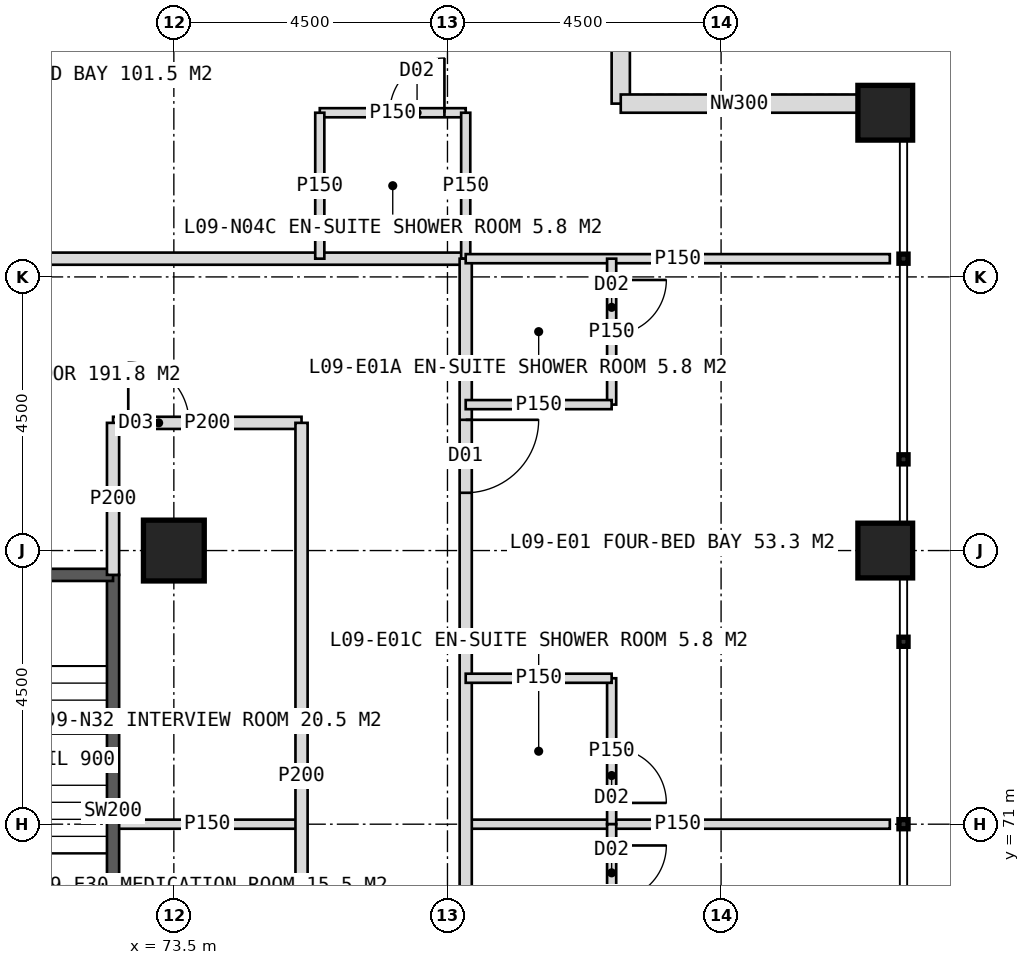
"""IFC4 building model, lengths in metres.
Left out: names, types, materials, properties, quantities, classifications, styles, units other than length and angle.
Written with IfcOpenShell. Run it as: python <this file> out.ifc"""

import sys

from ifc_helpers import new_model, si_unit, direction, frame, frame_2d, origin, origin_2d, place, context, subcontext, project, spatial, rectangle, hollow_rectangle, extrude, element, fill, save


model = new_model("IFC4")
c1 = context("Model", 3, precision=1e-05, world=origin(), true_north=direction((0.0, 1.0)))
c2 = subcontext(c1, "Body", "Model", "MODEL_VIEW")
j1 = project(units=[si_unit("LENGTHUNIT", "METRE"), si_unit("PLANEANGLEUNIT", "RADIAN")], contexts=[c1])
p1 = place(None, origin())
s1 = spatial("IfcSite", under=j1, at=p1, CompositionType="ELEMENT")
p2 = place(p1, origin())
s2 = spatial("IfcBuilding", under=s1, at=p2, CompositionType="ELEMENT")
p3 = place(p2, frame((0.0, 0.0, 43.0)))
s3 = spatial("IfcBuildingStorey", under=s2, at=p3, CompositionType="ELEMENT", Elevation=43.0)
p4 = place(p3, frame((73.5, 75.5, 0.0), z_axis=(0.0, 0.0, 1.0), x_axis=(1.0, 0.0, 0.0)))
e1 = element("IfcColumn", 1, at=p4, inside=s3, PredefinedType="COLUMN", context=c2, shape_type="SweptSolid", body=[
    extrude(hollow_rectangle(XDim=1.0, YDim=1.0, WallThickness=0.1, at=origin_2d()), origin(), (0.0, 0.0, 1.0), 4.0),
])
for number, where, z_axis, x_axis in (
    (2, (85.2, 75.5, 0.0), (0.0, 0.0, 1.0), (1.0, 0.0, 0.0)),
    (3, (85.2, 82.7, 0.0), (0.0, 0.0, 1.0), (1.0, 0.0, 0.0)),
):
    element("IfcColumn", number, at=place(p3, frame(where, z_axis=z_axis, x_axis=x_axis)), inside=s3, PredefinedType="COLUMN", context=c2, shape_type="SweptSolid", body=[
        extrude(hollow_rectangle(XDim=0.9, YDim=0.9, WallThickness=0.08, at=origin_2d()), origin(), (0.0, 0.0, 1.0), 4.0),
    ])
for number, where, z_axis, x_axis in (
    (4, (80.85, 86.75, 0.0), (0.0, 0.0, 1.0), (0.0, -1.0, 0.0)),
    (5, (80.85, 82.85, 0.0), (0.0, 0.0, 1.0), (1.0, 0.0, 0.0)),
):
    element("IfcWall", number, at=place(p3, frame(where, z_axis=z_axis, x_axis=x_axis)), inside=s3, PredefinedType="ELEMENTEDWALL", context=c2, shape_type="SweptSolid", body=[
        extrude(rectangle(XDim=3.9, YDim=0.3, at=frame_2d((1.95, 0.0))), origin(), (0.0, 0.0, 1.0), 2.95),
    ])
p5 = place(p3, frame((41.7, 80.3, 0.0), z_axis=(0.0, 0.0, 1.0), x_axis=(1.0, 0.0, 0.0)))
e6 = element("IfcWall", 6, at=p5, inside=s3, PredefinedType="PARTITIONING", context=c2, shape_type="SweptSolid", body=[
    extrude(rectangle(XDim=36.6, YDim=0.2, at=frame_2d((18.3, 0.0))), origin(), (0.0, 0.0, 1.0), 3.75),
])
p6 = place(p5, frame((2.65, 0.0, 0.0)))
e7 = element("IfcOpeningElement", 7, at=p6, cuts=e6, PredefinedType="OPENING", context=c2, shape_type="SweptSolid", body=[
    extrude(rectangle(XDim=1.2, YDim=2.2, at=frame_2d((0.6, 1.1))), frame((0.0, 0.11, 0.0), z_axis=(0.0, -1.0, 0.0), x_axis=(1.0, 0.0, 0.0)), (0.0, 0.0, 1.0), 0.22),
])
p7 = place(p5, frame((11.95, 0.0, 0.0)))
e8 = element("IfcOpeningElement", 8, at=p7, cuts=e6, PredefinedType="OPENING", context=c2, shape_type="SweptSolid", body=[
    extrude(rectangle(XDim=1.2, YDim=2.2, at=frame_2d((0.6, 1.1))), frame((0.0, 0.11, 0.0), z_axis=(0.0, -1.0, 0.0), x_axis=(1.0, 0.0, 0.0)), (0.0, 0.0, 1.0), 0.22),
])
p8 = place(p5, frame((20.8, 0.0, 0.0)))
e9 = element("IfcOpeningElement", 9, at=p8, cuts=e6, PredefinedType="OPENING", context=c2, shape_type="SweptSolid", body=[
    extrude(rectangle(XDim=1.0, YDim=2.1, at=frame_2d((0.5, 1.05))), frame((0.0, 0.11, 0.0), z_axis=(0.0, -1.0, 0.0), x_axis=(1.0, 0.0, 0.0)), (0.0, 0.0, 1.0), 0.22),
])
p9 = place(p5, frame((26.95, 0.0, 0.0)))
e10 = element("IfcOpeningElement", 10, at=p9, cuts=e6, PredefinedType="OPENING", context=c2, shape_type="SweptSolid", body=[
    extrude(rectangle(XDim=1.2, YDim=2.2, at=frame_2d((0.6, 1.1))), frame((0.0, 0.11, 0.0), z_axis=(0.0, -1.0, 0.0), x_axis=(1.0, 0.0, 0.0)), (0.0, 0.0, 1.0), 0.22),
])
p10 = place(p3, frame((75.9, 82.7, 0.0), z_axis=(0.0, 0.0, 1.0), x_axis=(1.0, 0.0, 0.0)))
e11 = element("IfcWall", 11, at=p10, inside=s3, PredefinedType="PARTITIONING", context=c2, shape_type="SweptSolid", body=[
    extrude(rectangle(XDim=2.4, YDim=0.15, at=frame_2d((1.2, 0.0))), origin(), (0.0, 0.0, 1.0), 2.95),
])
p11 = place(p10, frame((1.15, 0.0, 0.0)))
e12 = element("IfcOpeningElement", 12, at=p11, cuts=e11, PredefinedType="OPENING", context=c2, shape_type="SweptSolid", body=[
    extrude(rectangle(XDim=0.9, YDim=2.1, at=frame_2d((0.45, 1.05))), frame((0.0, 0.085, 0.0), z_axis=(0.0, -1.0, 0.0), x_axis=(1.0, 0.0, 0.0)), (0.0, 0.0, 1.0), 0.17),
])
for number, where, z_axis, x_axis in (
    (13, (75.9, 80.3, 0.0), (0.0, 0.0, 1.0), (0.0, 1.0, 0.0)),
    (14, (78.3, 80.3, 0.0), (0.0, 0.0, 1.0), (0.0, 1.0, 0.0)),
):
    element("IfcWall", number, at=place(p3, frame(where, z_axis=z_axis, x_axis=x_axis)), inside=s3, PredefinedType="PARTITIONING", context=c2, shape_type="SweptSolid", body=[
        extrude(rectangle(XDim=2.4, YDim=0.15, at=frame_2d((1.2, 0.0))), origin(), (0.0, 0.0, 1.0), 3.75),
    ])
p12 = place(p3, frame((72.5, 77.6, 0.0), z_axis=(0.0, 0.0, 1.0), x_axis=(1.0, 0.0, 0.0)))
e15 = element("IfcWall", 15, at=p12, inside=s3, PredefinedType="PARTITIONING", context=c2, shape_type="SweptSolid", body=[
    extrude(rectangle(XDim=3.1, YDim=0.2, at=frame_2d((1.55, 0.0))), origin(), (0.0, 0.0, 1.0), 3.75),
])
p13 = place(p12, frame((0.25, 0.0, 0.0)))
e16 = element("IfcOpeningElement", 16, at=p13, cuts=e15, PredefinedType="OPENING", context=c2, shape_type="SweptSolid", body=[
    extrude(rectangle(XDim=1.0, YDim=2.1, at=frame_2d((0.5, 1.05))), frame((0.0, 0.11, 0.0), z_axis=(0.0, -1.0, 0.0), x_axis=(1.0, 0.0, 0.0)), (0.0, 0.0, 1.0), 0.22),
])
p14 = place(p3, frame((78.3, 71.0, 0.0), z_axis=(0.0, 0.0, 1.0), x_axis=(1.0, 0.0, 0.0)))
e17 = element("IfcWall", 17, at=p14, inside=s3, PredefinedType="PARTITIONING", context=c2, shape_type="SweptSolid", body=[
    extrude(rectangle(XDim=6.975, YDim=0.15, at=frame_2d((3.487, 0.0))), origin(), (0.0, 0.0, 1.0), 3.75),
])
p15 = place(p3, frame((78.3, 80.3, 0.0), z_axis=(0.0, 0.0, 1.0), x_axis=(0.0, -1.0, 0.0)))
e18 = element("IfcWall", 18, at=p15, inside=s3, PredefinedType="PARTITIONING", context=c2, shape_type="SweptSolid", body=[
    extrude(rectangle(XDim=36.6, YDim=0.2, at=frame_2d((18.3, 0.0))), origin(), (0.0, 0.0, 1.0), 3.75),
])
p16 = place(p15, frame((2.65, 0.0, 0.0)))
e19 = element("IfcOpeningElement", 19, at=p16, cuts=e18, PredefinedType="OPENING", context=c2, shape_type="SweptSolid", body=[
    extrude(rectangle(XDim=1.2, YDim=2.2, at=frame_2d((0.6, 1.1))), frame((0.0, 0.11, 0.0), z_axis=(0.0, -1.0, 0.0), x_axis=(1.0, 0.0, 0.0)), (0.0, 0.0, 1.0), 0.22),
])
p17 = place(p15, frame((11.95, 0.0, 0.0)))
e20 = element("IfcOpeningElement", 20, at=p17, cuts=e18, PredefinedType="OPENING", context=c2, shape_type="SweptSolid", body=[
    extrude(rectangle(XDim=1.2, YDim=2.2, at=frame_2d((0.6, 1.1))), frame((0.0, 0.11, 0.0), z_axis=(0.0, -1.0, 0.0), x_axis=(1.0, 0.0, 0.0)), (0.0, 0.0, 1.0), 0.22),
])
p18 = place(p15, frame((20.95, 0.0, 0.0)))
e21 = element("IfcOpeningElement", 21, at=p18, cuts=e18, PredefinedType="OPENING", context=c2, shape_type="SweptSolid", body=[
    extrude(rectangle(XDim=1.2, YDim=2.2, at=frame_2d((0.6, 1.1))), frame((0.0, 0.11, 0.0), z_axis=(0.0, -1.0, 0.0), x_axis=(1.0, 0.0, 0.0)), (0.0, 0.0, 1.0), 0.22),
])
p19 = place(p15, frame((29.95, 0.0, 0.0)))
e22 = element("IfcOpeningElement", 22, at=p19, cuts=e18, PredefinedType="OPENING", context=c2, shape_type="SweptSolid", body=[
    extrude(rectangle(XDim=1.2, YDim=2.2, at=frame_2d((0.6, 1.1))), frame((0.0, 0.11, 0.0), z_axis=(0.0, -1.0, 0.0), x_axis=(1.0, 0.0, 0.0)), (0.0, 0.0, 1.0), 0.22),
])
p20 = place(p3, frame((78.3, 80.3, 0.0), z_axis=(0.0, 0.0, 1.0), x_axis=(1.0, 0.0, 0.0)))
e23 = element("IfcWall", 23, at=p20, inside=s3, PredefinedType="PARTITIONING", context=c2, shape_type="SweptSolid", body=[
    extrude(rectangle(XDim=6.975, YDim=0.15, at=frame_2d((3.487, 0.0))), origin(), (0.0, 0.0, 1.0), 3.75),
])
p21 = place(p3, frame((80.7, 80.3, 0.0), z_axis=(0.0, 0.0, 1.0), x_axis=(0.0, -1.0, 0.0)))
e24 = element("IfcWall", 24, at=p21, inside=s3, PredefinedType="PARTITIONING", context=c2, shape_type="SweptSolid", body=[
    extrude(rectangle(XDim=2.4, YDim=0.15, at=frame_2d((1.2, 0.0))), origin(), (0.0, 0.0, 1.0), 2.95),
])
p22 = place(p21, frame((0.35, 0.0, 0.0)))
e25 = element("IfcOpeningElement", 25, at=p22, cuts=e24, PredefinedType="OPENING", context=c2, shape_type="SweptSolid", body=[
    extrude(rectangle(XDim=0.9, YDim=2.1, at=frame_2d((0.45, 1.05))), frame((0.0, 0.085, 0.0), z_axis=(0.0, -1.0, 0.0), x_axis=(1.0, 0.0, 0.0)), (0.0, 0.0, 1.0), 0.17),
])
p23 = place(p3, frame((78.3, 77.9, 0.0), z_axis=(0.0, 0.0, 1.0), x_axis=(1.0, 0.0, 0.0)))
e26 = element("IfcWall", 26, at=p23, inside=s3, PredefinedType="PARTITIONING", context=c2, shape_type="SweptSolid", body=[
    extrude(rectangle(XDim=2.4, YDim=0.15, at=frame_2d((1.2, 0.0))), origin(), (0.0, 0.0, 1.0), 3.75),
])
p24 = place(p3, frame((80.7, 73.4, 0.0), z_axis=(0.0, 0.0, 1.0), x_axis=(0.0, -1.0, 0.0)))
e27 = element("IfcWall", 27, at=p24, inside=s3, PredefinedType="PARTITIONING", context=c2, shape_type="SweptSolid", body=[
    extrude(rectangle(XDim=2.4, YDim=0.15, at=frame_2d((1.2, 0.0))), origin(), (0.0, 0.0, 1.0), 3.75),
])
p25 = place(p24, frame((1.15, 0.0, 0.0)))
e28 = element("IfcOpeningElement", 28, at=p25, cuts=e27, PredefinedType="OPENING", context=c2, shape_type="SweptSolid", body=[
    extrude(rectangle(XDim=0.9, YDim=2.1, at=frame_2d((0.45, 1.05))), frame((0.0, 0.085, 0.0), z_axis=(0.0, -1.0, 0.0), x_axis=(1.0, 0.0, 0.0)), (0.0, 0.0, 1.0), 0.17),
])
p26 = place(p3, frame((78.3, 73.4, 0.0), z_axis=(0.0, 0.0, 1.0), x_axis=(1.0, 0.0, 0.0)))
e29 = element("IfcWall", 29, at=p26, inside=s3, PredefinedType="PARTITIONING", context=c2, shape_type="SweptSolid", body=[
    extrude(rectangle(XDim=2.4, YDim=0.15, at=frame_2d((1.2, 0.0))), origin(), (0.0, 0.0, 1.0), 3.75),
])
p27 = place(p3, frame((80.7, 71.0, 0.0), z_axis=(0.0, 0.0, 1.0), x_axis=(0.0, -1.0, 0.0)))
e30 = element("IfcWall", 30, at=p27, inside=s3, PredefinedType="PARTITIONING", context=c2, shape_type="SweptSolid", body=[
    extrude(rectangle(XDim=2.4, YDim=0.15, at=frame_2d((1.2, 0.0))), origin(), (0.0, 0.0, 1.0), 3.75),
])
p28 = place(p27, frame((0.35, 0.0, 0.0)))
e31 = element("IfcOpeningElement", 31, at=p28, cuts=e30, PredefinedType="OPENING", context=c2, shape_type="SweptSolid", body=[
    extrude(rectangle(XDim=0.9, YDim=2.1, at=frame_2d((0.45, 1.05))), frame((0.0, 0.085, 0.0), z_axis=(0.0, -1.0, 0.0), x_axis=(1.0, 0.0, 0.0)), (0.0, 0.0, 1.0), 0.17),
])
p29 = place(p3, frame((72.5, 71.0, 0.0), z_axis=(0.0, 0.0, 1.0), x_axis=(1.0, 0.0, 0.0)))
e32 = element("IfcWall", 32, at=p29, inside=s3, PredefinedType="PARTITIONING", context=c2, shape_type="SweptSolid", body=[
    extrude(rectangle(XDim=3.1, YDim=0.15, at=frame_2d((1.55, 0.0))), origin(), (0.0, 0.0, 1.0), 3.75),
])
p30 = place(p3, frame((75.6, 77.6, 0.0), z_axis=(0.0, 0.0, 1.0), x_axis=(0.0, -1.0, 0.0)))
e33 = element("IfcWall", 33, at=p30, inside=s3, PredefinedType="PARTITIONING", context=c2, shape_type="SweptSolid", body=[
    extrude(rectangle(XDim=11.6, YDim=0.2, at=frame_2d((5.8, 0.0))), origin(), (0.0, 0.0, 1.0), 3.75),
])
p31 = place(p30, frame((8.6, 0.0, 0.0)))
e34 = element("IfcOpeningElement", 34, at=p31, cuts=e33, PredefinedType="OPENING", context=c2, shape_type="SweptSolid", body=[
    extrude(rectangle(XDim=1.0, YDim=2.1, at=frame_2d((0.5, 1.05))), frame((0.0, 0.11, 0.0), z_axis=(0.0, -1.0, 0.0), x_axis=(1.0, 0.0, 0.0)), (0.0, 0.0, 1.0), 0.22),
])
p32 = place(p3, frame((72.5, 67.35, 0.0), z_axis=(0.0, 0.0, 1.0), x_axis=(0.0, 1.0, 0.0)))
e35 = element("IfcWall", 35, at=p32, inside=s3, PredefinedType="SOLIDWALL", context=c2, shape_type="SweptSolid", body=[
    extrude(rectangle(XDim=7.75, YDim=0.2, at=frame_2d((3.875, 0.0))), origin(), (0.0, 0.0, 1.0), 3.75),
])
p33 = place(p3, frame((69.0, 75.1, 0.0), z_axis=(0.0, 0.0, 1.0), x_axis=(1.0, 0.0, 0.0)))
e36 = element("IfcWall", 36, at=p33, inside=s3, PredefinedType="SOLIDWALL", context=c2, shape_type="SweptSolid", body=[
    extrude(rectangle(XDim=3.5, YDim=0.2, at=frame_2d((1.75, 0.0))), origin(), (0.0, 0.0, 1.0), 3.75),
])
p34 = place(p33, frame((1.15, 0.0, 0.0)))
e37 = element("IfcOpeningElement", 37, at=p34, cuts=e36, PredefinedType="OPENING", context=c2, shape_type="SweptSolid", body=[
    extrude(rectangle(XDim=1.2, YDim=2.1, at=frame_2d((0.6, 1.05))), frame((0.0, 0.11, 0.0), z_axis=(0.0, -1.0, 0.0), x_axis=(1.0, 0.0, 0.0)), (0.0, 0.0, 1.0), 0.22),
])
p35 = place(p3, frame((72.5, 75.1, 0.0), z_axis=(0.0, 0.0, 1.0), x_axis=(0.0, 1.0, 0.0)))
e38 = element("IfcWall", 38, at=p35, inside=s3, PredefinedType="PARTITIONING", context=c2, shape_type="SweptSolid", body=[
    extrude(rectangle(XDim=2.5, YDim=0.2, at=frame_2d((1.25, 0.0))), origin(), (0.0, 0.0, 1.0), 3.75),
])
p36 = place(p11, origin())
e39 = element("IfcDoor", 39, at=p36, inside=s3, OperationType="SINGLE_SWING_RIGHT", PredefinedType="DOOR", context=c2, shape_type="SweptSolid", body=[
    extrude(rectangle(XDim=0.9, YDim=2.1, at=frame_2d((0.45, 1.05))), frame((0.0, 0.025, 0.0), z_axis=(0.0, -1.0, 0.0), x_axis=(1.0, 0.0, 0.0)), (0.0, 0.0, 1.0), 0.05),
])
fill(e12, e39)
p37 = place(p13, origin())
e40 = element("IfcDoor", 40, at=p37, inside=s3, OperationType="SINGLE_SWING_LEFT", PredefinedType="DOOR", context=c2, shape_type="SweptSolid", body=[
    extrude(rectangle(XDim=1.0, YDim=2.1, at=frame_2d((0.5, 1.05))), frame((0.0, 0.025, 0.0), z_axis=(0.0, -1.0, 0.0), x_axis=(1.0, 0.0, 0.0)), (0.0, 0.0, 1.0), 0.05),
])
fill(e16, e40)
p38 = place(p16, origin())
e41 = element("IfcDoor", 41, at=p38, inside=s3, OperationType="SINGLE_SWING_LEFT", PredefinedType="DOOR", context=c2, shape_type="SweptSolid", body=[
    extrude(rectangle(XDim=1.2, YDim=2.2, at=frame_2d((0.6, 1.1))), frame((0.0, 0.025, 0.0), z_axis=(0.0, -1.0, 0.0), x_axis=(1.0, 0.0, 0.0)), (0.0, 0.0, 1.0), 0.05),
])
fill(e19, e41)
p39 = place(p22, origin())
e42 = element("IfcDoor", 42, at=p39, inside=s3, OperationType="SINGLE_SWING_LEFT", PredefinedType="DOOR", context=c2, shape_type="SweptSolid", body=[
    extrude(rectangle(XDim=0.9, YDim=2.1, at=frame_2d((0.45, 1.05))), frame((0.0, 0.025, 0.0), z_axis=(0.0, -1.0, 0.0), x_axis=(1.0, 0.0, 0.0)), (0.0, 0.0, 1.0), 0.05),
])
fill(e25, e42)
p40 = place(p25, origin())
e43 = element("IfcDoor", 43, at=p40, inside=s3, OperationType="SINGLE_SWING_RIGHT", PredefinedType="DOOR", context=c2, shape_type="SweptSolid", body=[
    extrude(rectangle(XDim=0.9, YDim=2.1, at=frame_2d((0.45, 1.05))), frame((0.0, 0.025, 0.0), z_axis=(0.0, -1.0, 0.0), x_axis=(1.0, 0.0, 0.0)), (0.0, 0.0, 1.0), 0.05),
])
fill(e28, e43)
p41 = place(p28, origin())
e44 = element("IfcDoor", 44, at=p41, inside=s3, OperationType="SINGLE_SWING_LEFT", PredefinedType="DOOR", context=c2, shape_type="SweptSolid", body=[
    extrude(rectangle(XDim=0.9, YDim=2.1, at=frame_2d((0.45, 1.05))), frame((0.0, 0.025, 0.0), z_axis=(0.0, -1.0, 0.0), x_axis=(1.0, 0.0, 0.0)), (0.0, 0.0, 1.0), 0.05),
])
fill(e31, e44)
save(model, sys.argv[1])
